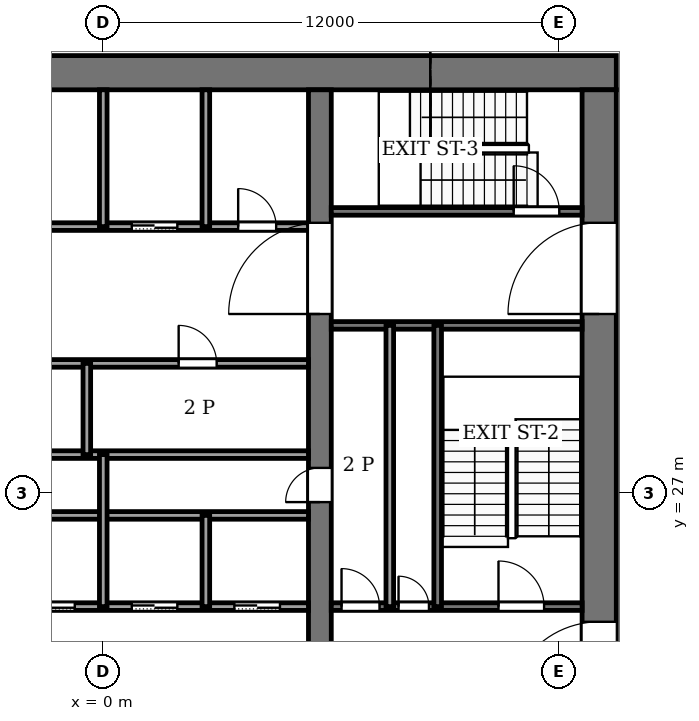
"""IFC4 building model, lengths in metres.
Left out: names, types, materials, properties, quantities, classifications, styles, units other than length and angle.
Written with IfcOpenShell. Run it as: python <this file> out.ifc"""

import sys

from ifc_helpers import new_model, si_unit, direction, frame, frame_2d, origin, place, context, subcontext, project, spatial, rectangle, extrude, element, fill, save


model = new_model("IFC4")
c1 = context("Model", 3, precision=1e-05, world=origin(), true_north=direction((0.0, 1.0)))
c2 = subcontext(c1, "Body", "Model", "MODEL_VIEW")
j1 = project(units=[si_unit("LENGTHUNIT", "METRE"), si_unit("PLANEANGLEUNIT", "RADIAN")], contexts=[c1])
p1 = place(None, origin())
s1 = spatial("IfcSite", under=j1, at=p1, CompositionType="ELEMENT")
p2 = place(p1, origin())
s2 = spatial("IfcBuilding", under=s1, at=p2, CompositionType="ELEMENT")
p3 = place(p2, frame((0.0, 0.0, 202.0)))
s3 = spatial("IfcBuildingStorey", under=s2, at=p3, CompositionType="ELEMENT", Elevation=202.0)
p4 = place(p3, frame((-13.5, 38.05, -0.13), z_axis=(0.0, 0.0, 1.0), x_axis=(1.0, 0.0, 0.0)))
e1 = element("IfcWall", 1, at=p4, inside=s3, PredefinedType="SHEAR", context=c2, shape_type="SweptSolid", body=[
    extrude(rectangle(XDim=27.0, YDim=0.9, at=frame_2d((13.5, 0.0))), origin(), (0.0, 0.0, 1.0), 4.0),
])
p5 = place(p3, frame((13.05, 18.4, -0.13), z_axis=(0.0, 0.0, 1.0), x_axis=(0.0, 1.0, 0.0)))
e2 = element("IfcWall", 2, at=p5, inside=s3, PredefinedType="SHEAR", context=c2, shape_type="SweptSolid", body=[
    extrude(rectangle(XDim=19.2, YDim=0.9, at=frame_2d((9.6, 0.0))), origin(), (0.0, 0.0, 1.0), 4.0),
])
p6 = place(p5, frame((2.8, 0.0, 0.13)))
e3 = element("IfcOpeningElement", 3, at=p6, cuts=e2, PredefinedType="OPENING", context=c2, shape_type="SweptSolid", body=[
    extrude(rectangle(XDim=2.4, YDim=2.4, at=frame_2d((1.2, 1.2))), frame((0.0, 0.46, 0.0), z_axis=(0.0, -1.0, 0.0), x_axis=(1.0, 0.0, 0.0)), (0.0, 0.0, 1.0), 0.92),
])
p7 = place(p5, frame((13.3, 0.0, 0.13)))
e4 = element("IfcOpeningElement", 4, at=p7, cuts=e2, PredefinedType="OPENING", context=c2, shape_type="SweptSolid", body=[
    extrude(rectangle(XDim=2.4, YDim=2.4, at=frame_2d((1.2, 1.2))), frame((0.0, 0.46, 0.0), z_axis=(0.0, -1.0, 0.0), x_axis=(1.0, 0.0, 0.0)), (0.0, 0.0, 1.0), 0.92),
])
p8 = place(p3, frame((5.7, 18.4, -0.13), z_axis=(0.0, 0.0, 1.0), x_axis=(0.0, 1.0, 0.0)))
e5 = element("IfcWall", 5, at=p8, inside=s3, PredefinedType="SHEAR", context=c2, shape_type="SweptSolid", body=[
    extrude(rectangle(XDim=19.2, YDim=0.6, at=frame_2d((9.6, 0.0))), origin(), (0.0, 0.0, 1.0), 4.0),
])
p9 = place(p8, frame((8.35, 0.0, 0.13)))
e6 = element("IfcOpeningElement", 6, at=p9, cuts=e5, PredefinedType="OPENING", context=c2, shape_type="SweptSolid", body=[
    extrude(rectangle(XDim=0.9, YDim=2.1, at=frame_2d((0.45, 1.05))), frame((0.0, 0.31, 0.0), z_axis=(0.0, -1.0, 0.0), x_axis=(1.0, 0.0, 0.0)), (0.0, 0.0, 1.0), 0.62),
])
p10 = place(p8, frame((13.3, 0.0, 0.13)))
e7 = element("IfcOpeningElement", 7, at=p10, cuts=e5, PredefinedType="OPENING", context=c2, shape_type="SweptSolid", body=[
    extrude(rectangle(XDim=2.4, YDim=2.4, at=frame_2d((1.2, 1.2))), frame((0.0, 0.31, 0.0), z_axis=(0.0, -1.0, 0.0), x_axis=(1.0, 0.0, 0.0)), (0.0, 0.0, 1.0), 0.62),
])
p11 = place(p3, frame((-5.4, 24.0, 0.0), z_axis=(0.0, 0.0, 1.0), x_axis=(1.0, 0.0, 0.0)))
e8 = element("IfcWall", 8, at=p11, inside=s3, PredefinedType="PARTITIONING", context=c2, shape_type="SweptSolid", body=[
    extrude(rectangle(XDim=10.8, YDim=0.2, at=frame_2d((5.4, 0.0))), origin(), (0.0, 0.0, 1.0), 3.87),
])
p12 = place(p11, frame((0.75, 0.0, 0.0)))
e9 = element("IfcOpeningElement", 9, at=p12, cuts=e8, PredefinedType="OPENING", context=c2, shape_type="SweptSolid", body=[
    extrude(rectangle(XDim=1.2, YDim=2.2, at=frame_2d((0.6, 1.1))), frame((0.0, 0.11, 0.0), z_axis=(0.0, -1.0, 0.0), x_axis=(1.0, 0.0, 0.0)), (0.0, 0.0, 1.0), 0.22),
])
p13 = place(p11, frame((3.45, 0.0, 0.0)))
e10 = element("IfcOpeningElement", 10, at=p13, cuts=e8, PredefinedType="OPENING", context=c2, shape_type="SweptSolid", body=[
    extrude(rectangle(XDim=1.2, YDim=2.2, at=frame_2d((0.6, 1.1))), frame((0.0, 0.11, 0.0), z_axis=(0.0, -1.0, 0.0), x_axis=(1.0, 0.0, 0.0)), (0.0, 0.0, 1.0), 0.22),
])
p14 = place(p11, frame((6.15, 0.0, 0.0)))
e11 = element("IfcOpeningElement", 11, at=p14, cuts=e8, PredefinedType="OPENING", context=c2, shape_type="SweptSolid", body=[
    extrude(rectangle(XDim=1.2, YDim=2.2, at=frame_2d((0.6, 1.1))), frame((0.0, 0.11, 0.0), z_axis=(0.0, -1.0, 0.0), x_axis=(1.0, 0.0, 0.0)), (0.0, 0.0, 1.0), 0.22),
])
p15 = place(p11, frame((8.85, 0.0, 0.0)))
e12 = element("IfcOpeningElement", 12, at=p15, cuts=e8, PredefinedType="OPENING", context=c2, shape_type="SweptSolid", body=[
    extrude(rectangle(XDim=1.2, YDim=2.2, at=frame_2d((0.6, 1.1))), frame((0.0, 0.11, 0.0), z_axis=(0.0, -1.0, 0.0), x_axis=(1.0, 0.0, 0.0)), (0.0, 0.0, 1.0), 0.22),
])
p16 = place(p3, frame((6.0, 24.0, 0.0), z_axis=(0.0, 0.0, 1.0), x_axis=(1.0, 0.0, 0.0)))
e13 = element("IfcWall", 13, at=p16, inside=s3, PredefinedType="PARTITIONING", context=c2, shape_type="SweptSolid", body=[
    extrude(rectangle(XDim=6.6, YDim=0.2, at=frame_2d((3.3, 0.0))), origin(), (0.0, 0.0, 1.0), 3.87),
])
p17 = place(p16, frame((0.27, 0.0, 0.0)))
e14 = element("IfcOpeningElement", 14, at=p17, cuts=e13, PredefinedType="OPENING", context=c2, shape_type="SweptSolid", body=[
    extrude(rectangle(XDim=1.0, YDim=2.1, at=frame_2d((0.5, 1.05))), frame((0.0, 0.11, 0.0), z_axis=(0.0, -1.0, 0.0), x_axis=(1.0, 0.0, 0.0)), (0.0, 0.0, 1.0), 0.22),
])
p18 = place(p16, frame((1.77, 0.0, 0.0)))
e15 = element("IfcOpeningElement", 15, at=p18, cuts=e13, PredefinedType="OPENING", context=c2, shape_type="SweptSolid", body=[
    extrude(rectangle(XDim=0.8, YDim=2.1, at=frame_2d((0.4, 1.05))), frame((0.0, 0.11, 0.0), z_axis=(0.0, -1.0, 0.0), x_axis=(1.0, 0.0, 0.0)), (0.0, 0.0, 1.0), 0.22),
])
p19 = place(p16, frame((4.4, 0.0, 0.0)))
e16 = element("IfcOpeningElement", 16, at=p19, cuts=e13, PredefinedType="OPENING", context=c2, shape_type="SweptSolid", body=[
    extrude(rectangle(XDim=1.2, YDim=2.2, at=frame_2d((0.6, 1.1))), frame((0.0, 0.11, 0.0), z_axis=(0.0, -1.0, 0.0), x_axis=(1.0, 0.0, 0.0)), (0.0, 0.0, 1.0), 0.22),
])
for number, where, z_axis, x_axis in (
    (17, (-5.4, 26.4, 0.0), (0.0, 0.0, 1.0), (1.0, 0.0, 0.0)),
    (18, (-5.4, 28.0, 0.0), (0.0, 0.0, 1.0), (1.0, 0.0, 0.0)),
):
    element("IfcWall", number, at=place(p3, frame(where, z_axis=z_axis, x_axis=x_axis)), inside=s3, PredefinedType="PARTITIONING", context=c2, shape_type="SweptSolid", body=[
        extrude(rectangle(XDim=10.8, YDim=0.2, at=frame_2d((5.4, 0.0))), origin(), (0.0, 0.0, 1.0), 3.87),
    ])
p20 = place(p3, frame((-5.4, 30.4, 0.0), z_axis=(0.0, 0.0, 1.0), x_axis=(1.0, 0.0, 0.0)))
e19 = element("IfcWall", 19, at=p20, inside=s3, PredefinedType="PARTITIONING", context=c2, shape_type="SweptSolid", body=[
    extrude(rectangle(XDim=10.8, YDim=0.2, at=frame_2d((5.4, 0.0))), origin(), (0.0, 0.0, 1.0), 3.87),
])
p21 = place(p20, frame((1.984, 0.0, 0.0)))
e20 = element("IfcOpeningElement", 20, at=p21, cuts=e19, PredefinedType="OPENING", context=c2, shape_type="SweptSolid", body=[
    extrude(rectangle(XDim=1.0, YDim=2.1, at=frame_2d((0.5, 1.05))), frame((0.0, 0.11, 0.0), z_axis=(0.0, -1.0, 0.0), x_axis=(1.0, 0.0, 0.0)), (0.0, 0.0, 1.0), 0.22),
])
p22 = place(p20, frame((7.384, 0.0, 0.0)))
e21 = element("IfcOpeningElement", 21, at=p22, cuts=e19, PredefinedType="OPENING", context=c2, shape_type="SweptSolid", body=[
    extrude(rectangle(XDim=1.0, YDim=2.1, at=frame_2d((0.5, 1.05))), frame((0.0, 0.11, 0.0), z_axis=(0.0, -1.0, 0.0), x_axis=(1.0, 0.0, 0.0)), (0.0, 0.0, 1.0), 0.22),
])
p23 = place(p3, frame((6.0, 31.4, 0.0), z_axis=(0.0, 0.0, 1.0), x_axis=(1.0, 0.0, 0.0)))
e22 = element("IfcWall", 22, at=p23, inside=s3, PredefinedType="PARTITIONING", context=c2, shape_type="SweptSolid", body=[
    extrude(rectangle(XDim=6.6, YDim=0.2, at=frame_2d((3.3, 0.0))), origin(), (0.0, 0.0, 1.0), 3.87),
])
p24 = place(p3, frame((-5.4, 34.0, 0.0), z_axis=(0.0, 0.0, 1.0), x_axis=(1.0, 0.0, 0.0)))
e23 = element("IfcWall", 23, at=p24, inside=s3, PredefinedType="PARTITIONING", context=c2, shape_type="SweptSolid", body=[
    extrude(rectangle(XDim=10.8, YDim=0.2, at=frame_2d((5.4, 0.0))), origin(), (0.0, 0.0, 1.0), 3.87),
])
p25 = place(p24, frame((6.15, 0.0, 0.0)))
e24 = element("IfcOpeningElement", 24, at=p25, cuts=e23, PredefinedType="OPENING", context=c2, shape_type="SweptSolid", body=[
    extrude(rectangle(XDim=1.2, YDim=2.2, at=frame_2d((0.6, 1.1))), frame((0.0, 0.11, 0.0), z_axis=(0.0, -1.0, 0.0), x_axis=(1.0, 0.0, 0.0)), (0.0, 0.0, 1.0), 0.22),
])
p26 = place(p24, frame((8.95, 0.0, 0.0)))
e25 = element("IfcOpeningElement", 25, at=p26, cuts=e23, PredefinedType="OPENING", context=c2, shape_type="SweptSolid", body=[
    extrude(rectangle(XDim=1.0, YDim=2.1, at=frame_2d((0.5, 1.05))), frame((0.0, 0.11, 0.0), z_axis=(0.0, -1.0, 0.0), x_axis=(1.0, 0.0, 0.0)), (0.0, 0.0, 1.0), 0.22),
])
p27 = place(p3, frame((6.0, 34.4, 0.0), z_axis=(0.0, 0.0, 1.0), x_axis=(1.0, 0.0, 0.0)))
e26 = element("IfcWall", 26, at=p27, inside=s3, PredefinedType="PARTITIONING", context=c2, shape_type="SweptSolid", body=[
    extrude(rectangle(XDim=6.6, YDim=0.2, at=frame_2d((3.3, 0.0))), origin(), (0.0, 0.0, 1.0), 3.87),
])
p28 = place(p27, frame((4.8, 0.0, 0.0)))
e27 = element("IfcOpeningElement", 27, at=p28, cuts=e26, PredefinedType="OPENING", context=c2, shape_type="SweptSolid", body=[
    extrude(rectangle(XDim=1.2, YDim=2.2, at=frame_2d((0.6, 1.1))), frame((0.0, 0.11, 0.0), z_axis=(0.0, -1.0, 0.0), x_axis=(1.0, 0.0, 0.0)), (0.0, 0.0, 1.0), 0.22),
])
p29 = place(p3, frame((-0.432, 28.0, 0.0), z_axis=(0.0, 0.0, 1.0), x_axis=(0.0, 1.0, 0.0)))
e28 = element("IfcWall", 28, at=p29, inside=s3, PredefinedType="PARTITIONING", context=c2, shape_type="SweptSolid", body=[
    extrude(rectangle(XDim=2.4, YDim=0.2, at=frame_2d((1.2, 0.0))), origin(), (0.0, 0.0, 1.0), 3.87),
])
p30 = place(p3, frame((0.0, 24.0, 0.0), z_axis=(0.0, 0.0, 1.0), x_axis=(0.0, 1.0, 0.0)))
e29 = element("IfcWall", 29, at=p30, inside=s3, PredefinedType="PARTITIONING", context=c2, shape_type="SweptSolid", body=[
    extrude(rectangle(XDim=4.0, YDim=0.2, at=frame_2d((2.0, 0.0))), origin(), (0.0, 0.0, 1.0), 3.87),
])
p31 = place(p3, frame((0.0, 34.0, 0.0), z_axis=(0.0, 0.0, 1.0), x_axis=(0.0, 1.0, 0.0)))
e30 = element("IfcWall", 30, at=p31, inside=s3, PredefinedType="PARTITIONING", context=c2, shape_type="SweptSolid", body=[
    extrude(rectangle(XDim=3.6, YDim=0.2, at=frame_2d((1.8, 0.0))), origin(), (0.0, 0.0, 1.0), 3.87),
])
p32 = place(p3, frame((2.7, 24.0, 0.0), z_axis=(0.0, 0.0, 1.0), x_axis=(0.0, 1.0, 0.0)))
e31 = element("IfcWall", 31, at=p32, inside=s3, PredefinedType="PARTITIONING", context=c2, shape_type="SweptSolid", body=[
    extrude(rectangle(XDim=2.4, YDim=0.2, at=frame_2d((1.2, 0.0))), origin(), (0.0, 0.0, 1.0), 3.87),
])
p33 = place(p3, frame((2.7, 34.0, 0.0), z_axis=(0.0, 0.0, 1.0), x_axis=(0.0, 1.0, 0.0)))
e32 = element("IfcWall", 32, at=p33, inside=s3, PredefinedType="PARTITIONING", context=c2, shape_type="SweptSolid", body=[
    extrude(rectangle(XDim=3.6, YDim=0.2, at=frame_2d((1.8, 0.0))), origin(), (0.0, 0.0, 1.0), 3.87),
])
for number, where, z_axis, x_axis in (
    (33, (7.54, 24.0, 0.0), (0.0, 0.0, 1.0), (0.0, 1.0, 0.0)),
    (34, (8.8, 24.0, 0.0), (0.0, 0.0, 1.0), (0.0, 1.0, 0.0)),
):
    element("IfcWall", number, at=place(p3, frame(where, z_axis=z_axis, x_axis=x_axis)), inside=s3, PredefinedType="PARTITIONING", context=c2, shape_type="SweptSolid", body=[
        extrude(rectangle(XDim=7.4, YDim=0.2, at=frame_2d((3.7, 0.0))), origin(), (0.0, 0.0, 1.0), 3.87),
    ])
p34 = place(p13, origin())
e35 = element("IfcDoor", 35, at=p34, inside=s3, OperationType="SLIDING_TO_LEFT", PredefinedType="DOOR", context=c2, shape_type="SweptSolid", body=[
    extrude(rectangle(XDim=1.2, YDim=2.2, at=frame_2d((0.6, 1.1))), frame((0.0, 0.025, 0.0), z_axis=(0.0, -1.0, 0.0), x_axis=(1.0, 0.0, 0.0)), (0.0, 0.0, 1.0), 0.05),
])
fill(e10, e35)
p35 = place(p14, origin())
e36 = element("IfcDoor", 36, at=p35, inside=s3, OperationType="SLIDING_TO_LEFT", PredefinedType="DOOR", context=c2, shape_type="SweptSolid", body=[
    extrude(rectangle(XDim=1.2, YDim=2.2, at=frame_2d((0.6, 1.1))), frame((0.0, 0.025, 0.0), z_axis=(0.0, -1.0, 0.0), x_axis=(1.0, 0.0, 0.0)), (0.0, 0.0, 1.0), 0.05),
])
fill(e11, e36)
p36 = place(p15, origin())
e37 = element("IfcDoor", 37, at=p36, inside=s3, OperationType="SLIDING_TO_LEFT", PredefinedType="DOOR", context=c2, shape_type="SweptSolid", body=[
    extrude(rectangle(XDim=1.2, YDim=2.2, at=frame_2d((0.6, 1.1))), frame((0.0, 0.025, 0.0), z_axis=(0.0, -1.0, 0.0), x_axis=(1.0, 0.0, 0.0)), (0.0, 0.0, 1.0), 0.05),
])
fill(e12, e37)
p37 = place(p25, origin())
e38 = element("IfcDoor", 38, at=p37, inside=s3, OperationType="SLIDING_TO_LEFT", PredefinedType="DOOR", context=c2, shape_type="SweptSolid", body=[
    extrude(rectangle(XDim=1.2, YDim=2.2, at=frame_2d((0.6, 1.1))), frame((0.0, 0.025, 0.0), z_axis=(0.0, -1.0, 0.0), x_axis=(1.0, 0.0, 0.0)), (0.0, 0.0, 1.0), 0.05),
])
fill(e24, e38)
p38 = place(p22, origin())
e39 = element("IfcDoor", 39, at=p38, inside=s3, OperationType="SINGLE_SWING_RIGHT", PredefinedType="DOOR", context=c2, shape_type="SweptSolid", body=[
    extrude(rectangle(XDim=1.0, YDim=2.1, at=frame_2d((0.5, 1.05))), frame((0.0, 0.025, 0.0), z_axis=(0.0, -1.0, 0.0), x_axis=(1.0, 0.0, 0.0)), (0.0, 0.0, 1.0), 0.05),
])
fill(e21, e39)
p39 = place(p17, origin())
e40 = element("IfcDoor", 40, at=p39, inside=s3, OperationType="SINGLE_SWING_RIGHT", PredefinedType="DOOR", context=c2, shape_type="SweptSolid", body=[
    extrude(rectangle(XDim=1.0, YDim=2.1, at=frame_2d((0.5, 1.05))), frame((0.0, 0.025, 0.0), z_axis=(0.0, -1.0, 0.0), x_axis=(1.0, 0.0, 0.0)), (0.0, 0.0, 1.0), 0.05),
])
fill(e14, e40)
p40 = place(p18, origin())
e41 = element("IfcDoor", 41, at=p40, inside=s3, OperationType="SINGLE_SWING_LEFT", PredefinedType="DOOR", context=c2, shape_type="SweptSolid", body=[
    extrude(rectangle(XDim=0.8, YDim=2.1, at=frame_2d((0.4, 1.05))), frame((0.0, 0.025, 0.0), z_axis=(0.0, -1.0, 0.0), x_axis=(1.0, 0.0, 0.0)), (0.0, 0.0, 1.0), 0.05),
])
fill(e15, e41)
p41 = place(p26, origin())
e42 = element("IfcDoor", 42, at=p41, inside=s3, OperationType="SINGLE_SWING_LEFT", PredefinedType="DOOR", context=c2, shape_type="SweptSolid", body=[
    extrude(rectangle(XDim=1.0, YDim=2.1, at=frame_2d((0.5, 1.05))), frame((0.0, 0.025, 0.0), z_axis=(0.0, -1.0, 0.0), x_axis=(1.0, 0.0, 0.0)), (0.0, 0.0, 1.0), 0.05),
])
fill(e25, e42)
p42 = place(p9, origin())
e43 = element("IfcDoor", 43, at=p42, inside=s3, OperationType="SINGLE_SWING_LEFT", PredefinedType="DOOR", context=c2, shape_type="SweptSolid", body=[
    extrude(rectangle(XDim=0.9, YDim=2.1, at=frame_2d((0.45, 1.05))), frame((0.0, 0.025, 0.0), z_axis=(0.0, -1.0, 0.0), x_axis=(1.0, 0.0, 0.0)), (0.0, 0.0, 1.0), 0.05),
])
fill(e6, e43)
p43 = place(p19, origin())
e44 = element("IfcDoor", 44, at=p43, inside=s3, OperationType="SINGLE_SWING_RIGHT", PredefinedType="DOOR", context=c2, shape_type="SweptSolid", body=[
    extrude(rectangle(XDim=1.2, YDim=2.2, at=frame_2d((0.6, 1.1))), frame((0.0, 0.025, 0.0), z_axis=(0.0, -1.0, 0.0), x_axis=(1.0, 0.0, 0.0)), (0.0, 0.0, 1.0), 0.05),
])
fill(e16, e44)
p44 = place(p28, origin())
e45 = element("IfcDoor", 45, at=p44, inside=s3, OperationType="SINGLE_SWING_LEFT", PredefinedType="DOOR", context=c2, shape_type="SweptSolid", body=[
    extrude(rectangle(XDim=1.2, YDim=2.2, at=frame_2d((0.6, 1.1))), frame((0.0, 0.025, 0.0), z_axis=(0.0, -1.0, 0.0), x_axis=(1.0, 0.0, 0.0)), (0.0, 0.0, 1.0), 0.05),
])
fill(e27, e45)
p45 = place(p10, origin())
e46 = element("IfcDoor", 46, at=p45, inside=s3, OperationType="DOUBLE_DOOR_SINGLE_SWING", PredefinedType="DOOR", context=c2, shape_type="SweptSolid", body=[
    extrude(rectangle(XDim=2.4, YDim=2.4, at=frame_2d((1.2, 1.2))), frame((0.0, 0.025, 0.0), z_axis=(0.0, -1.0, 0.0), x_axis=(1.0, 0.0, 0.0)), (0.0, 0.0, 1.0), 0.05),
])
fill(e7, e46)
p46 = place(p6, origin())
e47 = element("IfcDoor", 47, at=p46, inside=s3, OperationType="DOUBLE_DOOR_SINGLE_SWING", PredefinedType="DOOR", context=c2, shape_type="SweptSolid", body=[
    extrude(rectangle(XDim=2.4, YDim=2.4, at=frame_2d((1.2, 1.2))), frame((0.0, 0.025, 0.0), z_axis=(0.0, -1.0, 0.0), x_axis=(1.0, 0.0, 0.0)), (0.0, 0.0, 1.0), 0.05),
])
fill(e3, e47)
p47 = place(p7, origin())
e48 = element("IfcDoor", 48, at=p47, inside=s3, OperationType="DOUBLE_DOOR_SINGLE_SWING", PredefinedType="DOOR", context=c2, shape_type="SweptSolid", body=[
    extrude(rectangle(XDim=2.4, YDim=2.4, at=frame_2d((1.2, 1.2))), frame((0.0, 0.025, 0.0), z_axis=(0.0, -1.0, 0.0), x_axis=(1.0, 0.0, 0.0)), (0.0, 0.0, 1.0), 0.05),
])
fill(e4, e48)
save(model, sys.argv[1])
